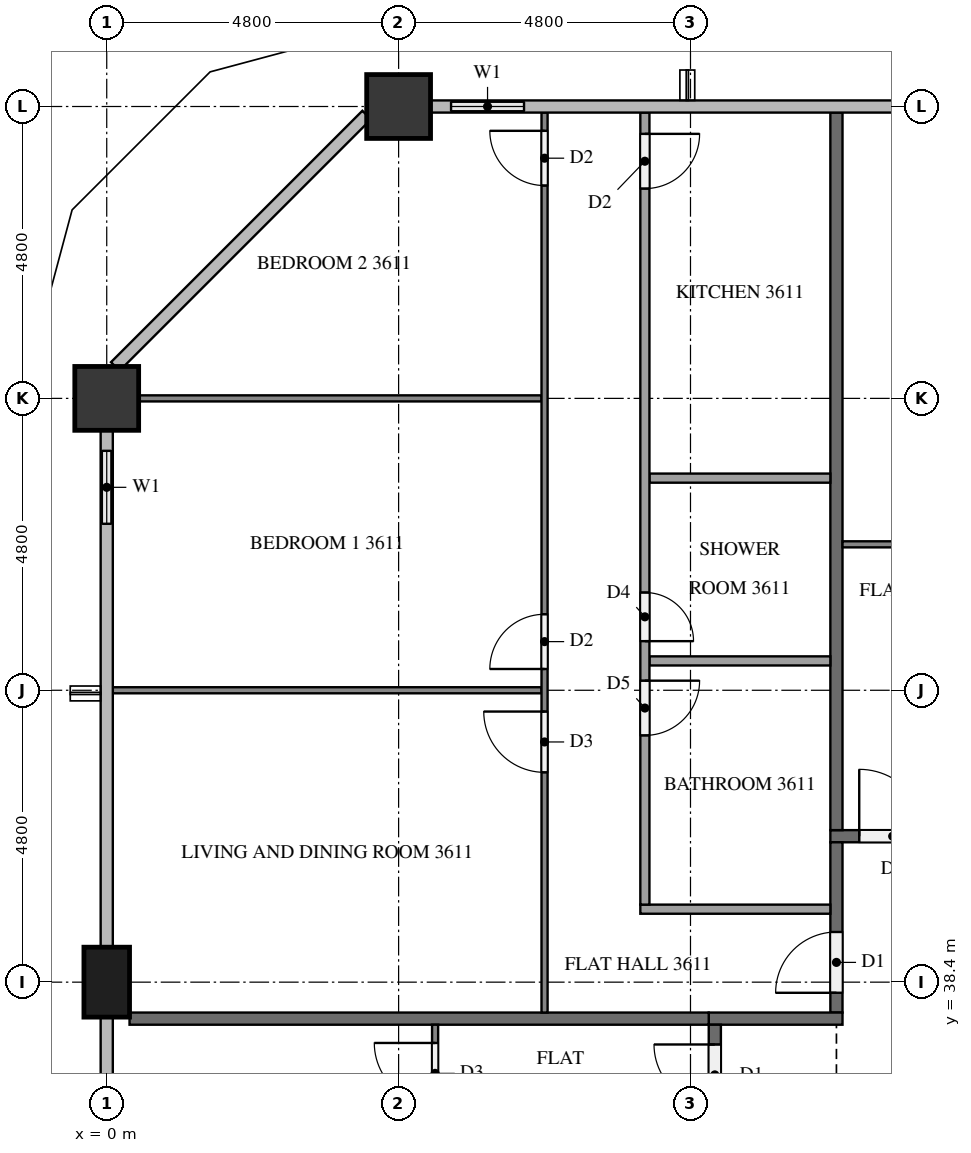
"""IFC4 building model, lengths in metres.
Left out: names, types, materials, properties, quantities, classifications, styles, units other than length and angle.
Written with IfcOpenShell. Run it as: python <this file> out.ifc"""

import sys

from ifc_helpers import new_model, si_unit, direction, frame, frame_2d, origin, origin_2d, place, context, subcontext, project, spatial, rectangle, extrude, element, fill, save


model = new_model("IFC4")
c1 = context("Model", 3, precision=1e-05, world=origin(), true_north=direction((0.0, 1.0)))
c2 = subcontext(c1, "Body", "Model", "MODEL_VIEW")
j1 = project(units=[si_unit("LENGTHUNIT", "METRE"), si_unit("PLANEANGLEUNIT", "RADIAN")], contexts=[c1])
p1 = place(None, origin())
s1 = spatial("IfcSite", under=j1, at=p1, CompositionType="ELEMENT")
p2 = place(p1, origin())
s2 = spatial("IfcBuilding", under=s1, at=p2, CompositionType="ELEMENT")
p3 = place(p2, frame((0.0, 0.0, 140.1)))
s3 = spatial("IfcBuildingStorey", under=s2, at=p3, CompositionType="ELEMENT", Elevation=140.1)
for number, where, z_axis, x_axis in (
    (1, (4.8, 52.8, 0.0), (0.0, 0.0, 1.0), (1.0, 0.0, 0.0)),
    (2, (0.0, 48.0, 0.0), (0.0, 0.0, 1.0), (1.0, 0.0, 0.0)),
):
    element("IfcColumn", number, at=place(p3, frame(where, z_axis=z_axis, x_axis=x_axis)), inside=s3, PredefinedType="COLUMN", context=c2, shape_type="SweptSolid", body=[
        extrude(rectangle(XDim=1.05, YDim=1.05, at=origin_2d()), origin(), (0.0, 0.0, 1.0), 3.1),
    ])
p4 = place(p3, frame((0.0, 38.4, 0.0), z_axis=(0.0, 0.0, 1.0), x_axis=(0.0, 1.0, 0.0)))
e3 = element("IfcColumn", 3, at=p4, inside=s3, PredefinedType="COLUMN", context=c2, shape_type="SweptSolid", body=[
    extrude(rectangle(XDim=1.15, YDim=0.75, at=origin_2d()), origin(), (0.0, 0.0, 1.0), 3.1),
])
p5 = place(p3, frame((7.2, 52.8, 0.0), z_axis=(0.0, 0.0, 1.0), x_axis=(-1.0, 0.0, 0.0)))
e4 = element("IfcWall", 4, at=p5, inside=s3, PredefinedType="SOLIDWALL", context=c2, shape_type="SweptSolid", body=[
    extrude(rectangle(XDim=1.875, YDim=0.15, at=frame_2d((0.938, 0.0))), origin(), (0.0, 0.0, 1.0), 3.1),
])
p6 = place(p5, frame((0.337, 0.0, 0.9)))
e5 = element("IfcOpeningElement", 5, at=p6, cuts=e4, PredefinedType="OPENING", context=c2, shape_type="SweptSolid", body=[
    extrude(rectangle(XDim=1.2, YDim=1.4, at=frame_2d((0.6, 0.7))), frame((0.0, 0.085, 0.0), z_axis=(0.0, -1.0, 0.0), x_axis=(1.0, 0.0, 0.0)), (0.0, 0.0, 1.0), 0.17),
])
p7 = place(p3, frame((0.0, 47.475, 0.0), z_axis=(0.0, 0.0, 1.0), x_axis=(0.0, -1.0, 0.0)))
e6 = element("IfcWall", 6, at=p7, inside=s3, PredefinedType="SOLIDWALL", context=c2, shape_type="SweptSolid", body=[
    extrude(rectangle(XDim=1.875, YDim=0.15, at=frame_2d((0.938, 0.0))), origin(), (0.0, 0.0, 1.0), 3.1),
])
p8 = place(p7, frame((0.337, 0.0, 0.9)))
e7 = element("IfcOpeningElement", 7, at=p8, cuts=e6, PredefinedType="OPENING", context=c2, shape_type="SweptSolid", body=[
    extrude(rectangle(XDim=1.2, YDim=1.4, at=frame_2d((0.6, 0.7))), frame((0.0, 0.085, 0.0), z_axis=(0.0, -1.0, 0.0), x_axis=(1.0, 0.0, 0.0)), (0.0, 0.0, 1.0), 0.17),
])
p9 = place(p3, frame((11.9, 40.8, 0.0), z_axis=(0.0, 0.0, 1.0), x_axis=(1.0, 0.0, 0.0)))
e8 = element("IfcWall", 8, at=p9, inside=s3, PredefinedType="PARTITIONING", context=c2, shape_type="SweptSolid", body=[
    extrude(rectangle(XDim=38.6, YDim=0.2, at=frame_2d((19.3, 0.0))), origin(), (0.0, 0.0, 1.0), 3.1),
])
p10 = place(p9, frame((37.075, 0.0, 0.0)))
e9 = element("IfcOpeningElement", 9, at=p10, cuts=e8, PredefinedType="OPENING", context=c2, shape_type="SweptSolid", body=[
    extrude(rectangle(XDim=1.0, YDim=2.1, at=frame_2d((0.5, 1.05))), frame((0.0, 0.11, 0.0), z_axis=(0.0, -1.0, 0.0), x_axis=(1.0, 0.0, 0.0)), (0.0, 0.0, 1.0), 0.22),
])
p11 = place(p9, frame((25.075, 0.0, 0.0)))
e10 = element("IfcOpeningElement", 10, at=p11, cuts=e8, PredefinedType="OPENING", context=c2, shape_type="SweptSolid", body=[
    extrude(rectangle(XDim=1.0, YDim=2.1, at=frame_2d((0.5, 1.05))), frame((0.0, 0.11, 0.0), z_axis=(0.0, -1.0, 0.0), x_axis=(1.0, 0.0, 0.0)), (0.0, 0.0, 1.0), 0.22),
])
p12 = place(p9, frame((0.475, 0.0, 0.0)))
e11 = element("IfcOpeningElement", 11, at=p12, cuts=e8, PredefinedType="OPENING", context=c2, shape_type="SweptSolid", body=[
    extrude(rectangle(XDim=1.1, YDim=2.1, at=frame_2d((0.55, 1.05))), frame((0.0, 0.11, 0.0), z_axis=(0.0, -1.0, 0.0), x_axis=(1.0, 0.0, 0.0)), (0.0, 0.0, 1.0), 0.22),
])
p13 = place(p3, frame((12.0, 37.9, 0.0), z_axis=(0.0, 0.0, 1.0), x_axis=(0.0, 1.0, 0.0)))
e12 = element("IfcWall", 12, at=p13, inside=s3, PredefinedType="PARTITIONING", context=c2, shape_type="SweptSolid", body=[
    extrude(rectangle(XDim=2.8, YDim=0.2, at=frame_2d((1.4, 0.0))), origin(), (0.0, 0.0, 1.0), 3.1),
])
p14 = place(p13, frame((0.325, 0.0, 0.0)))
e13 = element("IfcOpeningElement", 13, at=p14, cuts=e12, PredefinedType="OPENING", context=c2, shape_type="SweptSolid", body=[
    extrude(rectangle(XDim=1.0, YDim=2.1, at=frame_2d((0.5, 1.05))), frame((0.0, 0.11, 0.0), z_axis=(0.0, -1.0, 0.0), x_axis=(1.0, 0.0, 0.0)), (0.0, 0.0, 1.0), 0.22),
])
p15 = place(p3, frame((12.1, 37.8, 0.0), z_axis=(0.0, 0.0, 1.0), x_axis=(-1.0, 0.0, 0.0)))
e14 = element("IfcWall", 14, at=p15, inside=s3, PredefinedType="PARTITIONING", context=c2, shape_type="SweptSolid", body=[
    extrude(rectangle(XDim=2.2, YDim=0.2, at=frame_2d((1.1, 0.0))), origin(), (0.0, 0.0, 1.0), 3.1),
])
p16 = place(p3, frame((10.0, 15.1, 0.0), z_axis=(0.0, 0.0, 1.0), x_axis=(0.0, 1.0, 0.0)))
e15 = element("IfcWall", 15, at=p16, inside=s3, PredefinedType="PARTITIONING", context=c2, shape_type="SweptSolid", body=[
    extrude(rectangle(XDim=22.6, YDim=0.2, at=frame_2d((11.3, 0.0))), origin(), (0.0, 0.0, 1.0), 3.1),
])
p17 = place(p16, frame((21.275, 0.0, 0.0)))
e16 = element("IfcOpeningElement", 16, at=p17, cuts=e15, PredefinedType="OPENING", context=c2, shape_type="SweptSolid", body=[
    extrude(rectangle(XDim=1.0, YDim=2.1, at=frame_2d((0.5, 1.05))), frame((0.0, 0.11, 0.0), z_axis=(0.0, -1.0, 0.0), x_axis=(1.0, 0.0, 0.0)), (0.0, 0.0, 1.0), 0.22),
])
p18 = place(p16, frame((14.675, 0.0, 0.0)))
e17 = element("IfcOpeningElement", 17, at=p18, cuts=e15, PredefinedType="OPENING", context=c2, shape_type="SweptSolid", body=[
    extrude(rectangle(XDim=1.0, YDim=2.1, at=frame_2d((0.5, 1.05))), frame((0.0, 0.11, 0.0), z_axis=(0.0, -1.0, 0.0), x_axis=(1.0, 0.0, 0.0)), (0.0, 0.0, 1.0), 0.22),
])
p19 = place(p3, frame((12.0, 52.7, 0.0), z_axis=(0.0, 0.0, 1.0), x_axis=(0.0, -1.0, 0.0)))
e18 = element("IfcWall", 18, at=p19, inside=s3, PredefinedType="PARTITIONING", context=c2, shape_type="SweptSolid", body=[
    extrude(rectangle(XDim=11.8, YDim=0.2, at=frame_2d((5.9, 0.0))), origin(), (0.0, 0.0, 1.0), 3.1),
])
p20 = place(p3, frame((0.375, 37.8, 0.0), z_axis=(0.0, 0.0, 1.0), x_axis=(1.0, 0.0, 0.0)))
e19 = element("IfcWall", 19, at=p20, inside=s3, PredefinedType="PARTITIONING", context=c2, shape_type="SweptSolid", body=[
    extrude(rectangle(XDim=9.525, YDim=0.2, at=frame_2d((4.762, 0.0))), origin(), (0.0, 0.0, 1.0), 3.1),
])
p21 = place(p3, frame((12.1, 45.6, 0.0), z_axis=(0.0, 0.0, 1.0), x_axis=(1.0, 0.0, 0.0)))
e20 = element("IfcWall", 20, at=p21, inside=s3, PredefinedType="PARTITIONING", context=c2, shape_type="SweptSolid", body=[
    extrude(rectangle(XDim=19.0, YDim=0.1, at=frame_2d((9.5, 0.0))), origin(), (0.0, 0.0, 1.0), 3.1),
])
p22 = place(p21, frame((3.45, 0.0, 0.0)))
e21 = element("IfcOpeningElement", 21, at=p22, cuts=e20, PredefinedType="OPENING", context=c2, shape_type="SweptSolid", body=[
    extrude(rectangle(XDim=0.9, YDim=2.1, at=frame_2d((0.45, 1.05))), frame((0.0, 0.06, 0.0), z_axis=(0.0, -1.0, 0.0), x_axis=(1.0, 0.0, 0.0)), (0.0, 0.0, 1.0), 0.12),
])
p23 = place(p21, frame((5.05, 0.0, 0.0)))
e22 = element("IfcOpeningElement", 22, at=p23, cuts=e20, PredefinedType="OPENING", context=c2, shape_type="SweptSolid", body=[
    extrude(rectangle(XDim=0.9, YDim=2.1, at=frame_2d((0.45, 1.05))), frame((0.0, 0.06, 0.0), z_axis=(0.0, -1.0, 0.0), x_axis=(1.0, 0.0, 0.0)), (0.0, 0.0, 1.0), 0.12),
])
p24 = place(p21, frame((13.05, 0.0, 0.0)))
e23 = element("IfcOpeningElement", 23, at=p24, cuts=e20, PredefinedType="OPENING", context=c2, shape_type="SweptSolid", body=[
    extrude(rectangle(XDim=0.9, YDim=2.1, at=frame_2d((0.45, 1.05))), frame((0.0, 0.06, 0.0), z_axis=(0.0, -1.0, 0.0), x_axis=(1.0, 0.0, 0.0)), (0.0, 0.0, 1.0), 0.12),
])
p25 = place(p21, frame((14.65, 0.0, 0.0)))
e24 = element("IfcOpeningElement", 24, at=p25, cuts=e20, PredefinedType="OPENING", context=c2, shape_type="SweptSolid", body=[
    extrude(rectangle(XDim=1.0, YDim=2.1, at=frame_2d((0.5, 1.05))), frame((0.0, 0.06, 0.0), z_axis=(0.0, -1.0, 0.0), x_axis=(1.0, 0.0, 0.0)), (0.0, 0.0, 1.0), 0.12),
])
p26 = place(p3, frame((7.15, 43.2, 0.0), z_axis=(0.0, 0.0, 1.0), x_axis=(-1.0, 0.0, 0.0)))
e25 = element("IfcWall", 25, at=p26, inside=s3, PredefinedType="PARTITIONING", context=c2, shape_type="SweptSolid", body=[
    extrude(rectangle(XDim=7.05, YDim=0.1, at=frame_2d((3.525, 0.0))), origin(), (0.0, 0.0, 1.0), 3.1),
])
p27 = place(p3, frame((7.15, 48.0, 0.0), z_axis=(0.0, 0.0, 1.0), x_axis=(-1.0, 0.0, 0.0)))
e26 = element("IfcWall", 26, at=p27, inside=s3, PredefinedType="PARTITIONING", context=c2, shape_type="SweptSolid", body=[
    extrude(rectangle(XDim=6.625, YDim=0.1, at=frame_2d((3.312, 0.0))), origin(), (0.0, 0.0, 1.0), 3.1),
])
p28 = place(p3, frame((7.2, 37.9, 0.0), z_axis=(0.0, 0.0, 1.0), x_axis=(0.0, 1.0, 0.0)))
e27 = element("IfcWall", 27, at=p28, inside=s3, PredefinedType="PARTITIONING", context=c2, shape_type="SweptSolid", body=[
    extrude(rectangle(XDim=14.8, YDim=0.1, at=frame_2d((7.4, 0.0))), origin(), (0.0, 0.0, 1.0), 3.1),
])
p29 = place(p28, frame((3.95, 0.0, 0.0)))
e28 = element("IfcOpeningElement", 28, at=p29, cuts=e27, PredefinedType="OPENING", context=c2, shape_type="SweptSolid", body=[
    extrude(rectangle(XDim=1.0, YDim=2.1, at=frame_2d((0.5, 1.05))), frame((0.0, 0.06, 0.0), z_axis=(0.0, -1.0, 0.0), x_axis=(1.0, 0.0, 0.0)), (0.0, 0.0, 1.0), 0.12),
])
p30 = place(p28, frame((5.65, 0.0, 0.0)))
e29 = element("IfcOpeningElement", 29, at=p30, cuts=e27, PredefinedType="OPENING", context=c2, shape_type="SweptSolid", body=[
    extrude(rectangle(XDim=0.9, YDim=2.1, at=frame_2d((0.45, 1.05))), frame((0.0, 0.06, 0.0), z_axis=(0.0, -1.0, 0.0), x_axis=(1.0, 0.0, 0.0)), (0.0, 0.0, 1.0), 0.12),
])
p31 = place(p28, frame((13.6, 0.0, 0.0)))
e30 = element("IfcOpeningElement", 30, at=p31, cuts=e27, PredefinedType="OPENING", context=c2, shape_type="SweptSolid", body=[
    extrude(rectangle(XDim=0.9, YDim=2.1, at=frame_2d((0.45, 1.05))), frame((0.0, 0.06, 0.0), z_axis=(0.0, -1.0, 0.0), x_axis=(1.0, 0.0, 0.0)), (0.0, 0.0, 1.0), 0.12),
])
for number, where, z_axis, x_axis in (
    (31, (11.9, 43.683, 0.0), (0.0, 0.0, 1.0), (-1.0, 0.0, 0.0)),
    (32, (11.9, 46.688, 0.0), (0.0, 0.0, 1.0), (-1.0, 0.0, 0.0)),
):
    element("IfcWall", number, at=place(p3, frame(where, z_axis=z_axis, x_axis=x_axis)), inside=s3, PredefinedType="PARTITIONING", context=c2, shape_type="SweptSolid", body=[
        extrude(rectangle(XDim=2.975, YDim=0.15, at=frame_2d((1.487, 0.0))), origin(), (0.0, 0.0, 1.0), 3.1),
    ])
p32 = place(p3, frame((11.9, 39.6, 0.0), z_axis=(0.0, 0.0, 1.0), x_axis=(-1.0, 0.0, 0.0)))
e33 = element("IfcWall", 33, at=p32, inside=s3, PredefinedType="PARTITIONING", context=c2, shape_type="SweptSolid", body=[
    extrude(rectangle(XDim=3.125, YDim=0.15, at=frame_2d((1.562, 0.0))), origin(), (0.0, 0.0, 1.0), 3.1),
])
p33 = place(p3, frame((8.85, 52.7, 0.0), z_axis=(0.0, 0.0, 1.0), x_axis=(0.0, -1.0, 0.0)))
e34 = element("IfcWall", 34, at=p33, inside=s3, PredefinedType="PARTITIONING", context=c2, shape_type="SweptSolid", body=[
    extrude(rectangle(XDim=13.025, YDim=0.15, at=frame_2d((6.512, 0.0))), origin(), (0.0, 0.0, 1.0), 3.1),
])
p34 = place(p33, frame((9.342, 0.0, 0.0)))
e35 = element("IfcOpeningElement", 35, at=p34, cuts=e34, PredefinedType="OPENING", context=c2, shape_type="SweptSolid", body=[
    extrude(rectangle(XDim=0.9, YDim=2.1, at=frame_2d((0.45, 1.05))), frame((0.0, 0.085, 0.0), z_axis=(0.0, -1.0, 0.0), x_axis=(1.0, 0.0, 0.0)), (0.0, 0.0, 1.0), 0.17),
])
p35 = place(p33, frame((7.892, 0.0, 0.0)))
e36 = element("IfcOpeningElement", 36, at=p35, cuts=e34, PredefinedType="OPENING", context=c2, shape_type="SweptSolid", body=[
    extrude(rectangle(XDim=0.8, YDim=2.1, at=frame_2d((0.4, 1.05))), frame((0.0, 0.085, 0.0), z_axis=(0.0, -1.0, 0.0), x_axis=(1.0, 0.0, 0.0)), (0.0, 0.0, 1.0), 0.17),
])
p36 = place(p33, frame((0.35, 0.0, 0.0)))
e37 = element("IfcOpeningElement", 37, at=p36, cuts=e34, PredefinedType="OPENING", context=c2, shape_type="SweptSolid", body=[
    extrude(rectangle(XDim=0.9, YDim=2.1, at=frame_2d((0.45, 1.05))), frame((0.0, 0.085, 0.0), z_axis=(0.0, -1.0, 0.0), x_axis=(1.0, 0.0, 0.0)), (0.0, 0.0, 1.0), 0.17),
])
p37 = place(p3, frame((5.4, 31.3, 0.0), z_axis=(0.0, 0.0, 1.0), x_axis=(0.0, 1.0, 0.0)))
e38 = element("IfcWall", 38, at=p37, inside=s3, PredefinedType="PARTITIONING", context=c2, shape_type="SweptSolid", body=[
    extrude(rectangle(XDim=6.4, YDim=0.1, at=frame_2d((3.2, 0.0))), origin(), (0.0, 0.0, 1.0), 3.1),
])
p38 = place(p37, frame((5.1, 0.0, 0.0)))
e39 = element("IfcOpeningElement", 39, at=p38, cuts=e38, PredefinedType="OPENING", context=c2, shape_type="SweptSolid", body=[
    extrude(rectangle(XDim=1.0, YDim=2.1, at=frame_2d((0.5, 1.05))), frame((0.0, 0.06, 0.0), z_axis=(0.0, -1.0, 0.0), x_axis=(1.0, 0.0, 0.0)), (0.0, 0.0, 1.0), 0.12),
])
p39 = place(p6, origin())
e40 = element("IfcWindow", 40, at=p39, inside=s3, PartitioningType="SINGLE_PANEL", PredefinedType="WINDOW", context=c2, shape_type="SweptSolid", body=[
    extrude(rectangle(XDim=1.2, YDim=1.4, at=frame_2d((0.6, 0.7))), frame((0.0, 0.03, 0.0), z_axis=(0.0, -1.0, 0.0), x_axis=(1.0, 0.0, 0.0)), (0.0, 0.0, 1.0), 0.06),
])
fill(e5, e40)
p40 = place(p8, origin())
e41 = element("IfcWindow", 41, at=p40, inside=s3, PartitioningType="SINGLE_PANEL", PredefinedType="WINDOW", context=c2, shape_type="SweptSolid", body=[
    extrude(rectangle(XDim=1.2, YDim=1.4, at=frame_2d((0.6, 0.7))), frame((0.0, 0.03, 0.0), z_axis=(0.0, -1.0, 0.0), x_axis=(1.0, 0.0, 0.0)), (0.0, 0.0, 1.0), 0.06),
])
fill(e7, e41)
p41 = place(p12, origin())
e42 = element("IfcDoor", 42, at=p41, inside=s3, OperationType="SINGLE_SWING_LEFT", PredefinedType="DOOR", context=c2, shape_type="SweptSolid", body=[
    extrude(rectangle(XDim=1.1, YDim=2.1, at=frame_2d((0.55, 1.05))), frame((0.0, 0.025, 0.0), z_axis=(0.0, -1.0, 0.0), x_axis=(1.0, 0.0, 0.0)), (0.0, 0.0, 1.0), 0.05),
])
fill(e11, e42)
p42 = place(p14, origin())
e43 = element("IfcDoor", 43, at=p42, inside=s3, OperationType="SINGLE_SWING_LEFT", PredefinedType="DOOR", context=c2, shape_type="SweptSolid", body=[
    extrude(rectangle(XDim=1.0, YDim=2.1, at=frame_2d((0.5, 1.05))), frame((0.0, 0.025, 0.0), z_axis=(0.0, -1.0, 0.0), x_axis=(1.0, 0.0, 0.0)), (0.0, 0.0, 1.0), 0.05),
])
fill(e13, e43)
p43 = place(p17, origin())
e44 = element("IfcDoor", 44, at=p43, inside=s3, OperationType="SINGLE_SWING_RIGHT", PredefinedType="DOOR", context=c2, shape_type="SweptSolid", body=[
    extrude(rectangle(XDim=1.0, YDim=2.1, at=frame_2d((0.5, 1.05))), frame((0.0, 0.025, 0.0), z_axis=(0.0, -1.0, 0.0), x_axis=(1.0, 0.0, 0.0)), (0.0, 0.0, 1.0), 0.05),
])
fill(e16, e44)
p44 = place(p29, origin())
e45 = element("IfcDoor", 45, at=p44, inside=s3, OperationType="SINGLE_SWING_RIGHT", PredefinedType="DOOR", context=c2, shape_type="SweptSolid", body=[
    extrude(rectangle(XDim=1.0, YDim=2.1, at=frame_2d((0.5, 1.05))), frame((0.0, 0.025, 0.0), z_axis=(0.0, -1.0, 0.0), x_axis=(1.0, 0.0, 0.0)), (0.0, 0.0, 1.0), 0.05),
])
fill(e28, e45)
p45 = place(p30, origin())
e46 = element("IfcDoor", 46, at=p45, inside=s3, OperationType="SINGLE_SWING_LEFT", PredefinedType="DOOR", context=c2, shape_type="SweptSolid", body=[
    extrude(rectangle(XDim=0.9, YDim=2.1, at=frame_2d((0.45, 1.05))), frame((0.0, 0.025, 0.0), z_axis=(0.0, -1.0, 0.0), x_axis=(1.0, 0.0, 0.0)), (0.0, 0.0, 1.0), 0.05),
])
fill(e29, e46)
p46 = place(p31, origin())
e47 = element("IfcDoor", 47, at=p46, inside=s3, OperationType="SINGLE_SWING_RIGHT", PredefinedType="DOOR", context=c2, shape_type="SweptSolid", body=[
    extrude(rectangle(XDim=0.9, YDim=2.1, at=frame_2d((0.45, 1.05))), frame((0.0, 0.025, 0.0), z_axis=(0.0, -1.0, 0.0), x_axis=(1.0, 0.0, 0.0)), (0.0, 0.0, 1.0), 0.05),
])
fill(e30, e47)
p47 = place(p34, origin())
e48 = element("IfcDoor", 48, at=p47, inside=s3, OperationType="SINGLE_SWING_LEFT", PredefinedType="DOOR", context=c2, shape_type="SweptSolid", body=[
    extrude(rectangle(XDim=0.9, YDim=2.1, at=frame_2d((0.45, 1.05))), frame((0.0, 0.025, 0.0), z_axis=(0.0, -1.0, 0.0), x_axis=(1.0, 0.0, 0.0)), (0.0, 0.0, 1.0), 0.05),
])
fill(e35, e48)
p48 = place(p35, origin())
e49 = element("IfcDoor", 49, at=p48, inside=s3, OperationType="SINGLE_SWING_RIGHT", PredefinedType="DOOR", context=c2, shape_type="SweptSolid", body=[
    extrude(rectangle(XDim=0.8, YDim=2.1, at=frame_2d((0.4, 1.05))), frame((0.0, 0.025, 0.0), z_axis=(0.0, -1.0, 0.0), x_axis=(1.0, 0.0, 0.0)), (0.0, 0.0, 1.0), 0.05),
])
fill(e36, e49)
p49 = place(p36, origin())
e50 = element("IfcDoor", 50, at=p49, inside=s3, OperationType="SINGLE_SWING_LEFT", PredefinedType="DOOR", context=c2, shape_type="SweptSolid", body=[
    extrude(rectangle(XDim=0.9, YDim=2.1, at=frame_2d((0.45, 1.05))), frame((0.0, 0.025, 0.0), z_axis=(0.0, -1.0, 0.0), x_axis=(1.0, 0.0, 0.0)), (0.0, 0.0, 1.0), 0.05),
])
fill(e37, e50)
p50 = place(p38, origin())
e51 = element("IfcDoor", 51, at=p50, inside=s3, OperationType="SINGLE_SWING_RIGHT", PredefinedType="DOOR", context=c2, shape_type="SweptSolid", body=[
    extrude(rectangle(XDim=1.0, YDim=2.1, at=frame_2d((0.5, 1.05))), frame((0.0, 0.025, 0.0), z_axis=(0.0, -1.0, 0.0), x_axis=(1.0, 0.0, 0.0)), (0.0, 0.0, 1.0), 0.05),
])
fill(e39, e51)
save(model, sys.argv[1])
